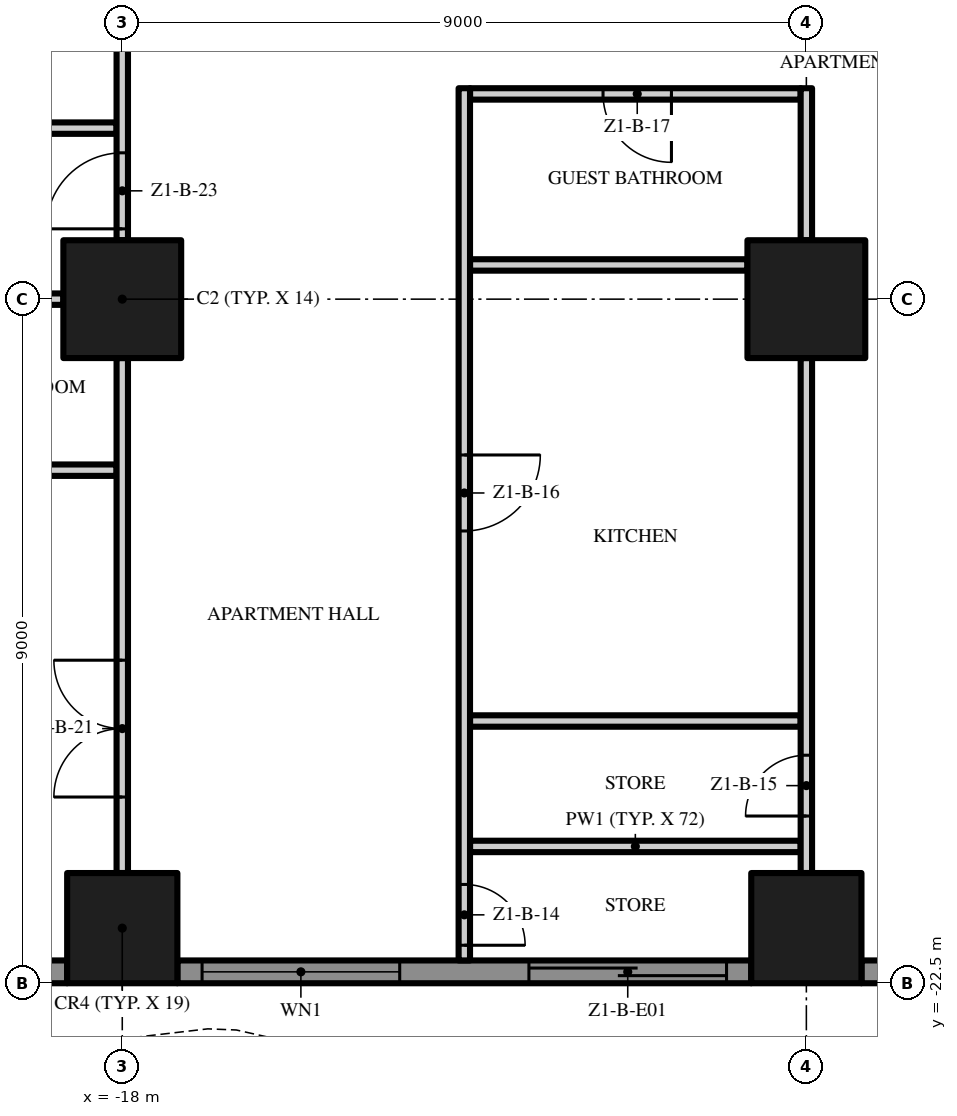
"""IFC4 building model, lengths in metres.
Left out: names, types, materials, properties, quantities, classifications, styles, units other than length and angle.
Written with IfcOpenShell. Run it as: python <this file> out.ifc"""

import sys

from ifc_helpers import new_model, si_unit, direction, frame, frame_2d, origin, origin_2d, place, context, subcontext, project, spatial, polyline, rectangle, outline, extrude, element, fill, save


model = new_model("IFC4")
c1 = context("Model", 3, precision=1e-05, world=origin(), true_north=direction((0.0, 1.0)))
c2 = subcontext(c1, "Body", "Model", "MODEL_VIEW")
j1 = project(units=[si_unit("LENGTHUNIT", "METRE"), si_unit("PLANEANGLEUNIT", "RADIAN")], contexts=[c1])
p1 = place(None, origin())
s1 = spatial("IfcSite", under=j1, at=p1, CompositionType="ELEMENT")
p2 = place(p1, origin())
s2 = spatial("IfcBuilding", under=s1, at=p2, CompositionType="ELEMENT")
p3 = place(p2, frame((0.0, 0.0, 26.4)))
s3 = spatial("IfcBuildingStorey", under=s2, at=p3, CompositionType="ELEMENT", Elevation=26.4)
p4 = place(p3, frame((-18.0, -13.5, 0.0), z_axis=(0.0, 0.0, 1.0), x_axis=(1.0, 0.0, 0.0)))
e1 = element("IfcColumn", 1, at=p4, inside=s3, PredefinedType="COLUMN", context=c2, shape_type="SweptSolid", body=[
    extrude(rectangle(XDim=1.55, YDim=1.55, at=origin_2d()), origin(), (0.0, 0.0, 1.0), 3.5),
])
p5 = place(p3, frame((-18.0, -21.775, 0.0), z_axis=(0.0, 0.0, 1.0), x_axis=(1.0, 0.0, 0.0)))
e2 = element("IfcColumn", 2, at=p5, inside=s3, PredefinedType="COLUMN", context=c2, shape_type="SweptSolid", body=[
    extrude(rectangle(XDim=1.45, YDim=1.45, at=origin_2d()), origin(), (0.0, 0.0, 1.0), 3.5),
])
p6 = place(p3, frame((-9.0, -13.5, 0.0), z_axis=(0.0, 0.0, 1.0), x_axis=(1.0, 0.0, 0.0)))
e3 = element("IfcColumn", 3, at=p6, inside=s3, PredefinedType="COLUMN", context=c2, shape_type="SweptSolid", body=[
    extrude(rectangle(XDim=1.55, YDim=1.55, at=origin_2d()), origin(), (0.0, 0.0, 1.0), 3.5),
])
p7 = place(p3, frame((-9.0, -21.775, 0.0), z_axis=(0.0, 0.0, 1.0), x_axis=(1.0, 0.0, 0.0)))
e4 = element("IfcColumn", 4, at=p7, inside=s3, PredefinedType="COLUMN", context=c2, shape_type="SweptSolid", body=[
    extrude(rectangle(XDim=1.45, YDim=1.45, at=origin_2d()), origin(), (0.0, 0.0, 1.0), 3.5),
])
p8 = place(p3, frame((-18.725, -22.35, 0.0), z_axis=(0.0, 0.0, 1.0), x_axis=(-1.0, 0.0, 0.0)))
e5 = element("IfcWall", 5, at=p8, inside=s3, PredefinedType="SOLIDWALL", context=c2, shape_type="SweptSolid", body=[
    extrude(rectangle(XDim=3.475, YDim=0.3, at=frame_2d((1.738, 0.0))), origin(), (0.0, 0.0, 1.0), 3.5),
])
p9 = place(p8, frame((0.325, 0.0, 0.45)))
e6 = element("IfcOpeningElement", 6, at=p9, cuts=e5, PredefinedType="OPENING", context=c2, shape_type="SweptSolid", body=[
    extrude(rectangle(XDim=2.6, YDim=2.65, at=frame_2d((1.3, 1.325))), frame((0.0, 0.16, 0.0), z_axis=(0.0, -1.0, 0.0), x_axis=(1.0, 0.0, 0.0)), (0.0, 0.0, 1.0), 0.32),
])
p10 = place(p3, frame((-9.725, -22.35, 0.0), z_axis=(0.0, 0.0, 1.0), x_axis=(-1.0, 0.0, 0.0)))
e7 = element("IfcWall", 7, at=p10, inside=s3, PredefinedType="SOLIDWALL", context=c2, shape_type="SweptSolid", body=[
    extrude(rectangle(XDim=7.55, YDim=0.3, at=frame_2d((3.775, 0.0))), origin(), (0.0, 0.0, 1.0), 3.5),
])
p11 = place(p10, frame((4.625, 0.0, 0.45)))
e8 = element("IfcOpeningElement", 8, at=p11, cuts=e7, PredefinedType="OPENING", context=c2, shape_type="SweptSolid", body=[
    extrude(rectangle(XDim=2.6, YDim=2.65, at=frame_2d((1.3, 1.325))), frame((0.0, 0.16, 0.0), z_axis=(0.0, -1.0, 0.0), x_axis=(1.0, 0.0, 0.0)), (0.0, 0.0, 1.0), 0.32),
])
p12 = place(p10, frame((0.325, 0.0, 0.0)))
e9 = element("IfcOpeningElement", 9, at=p12, cuts=e7, PredefinedType="OPENING", context=c2, shape_type="SweptSolid", body=[
    extrude(rectangle(XDim=2.6, YDim=2.4, at=frame_2d((1.3, 1.2))), frame((0.0, 0.16, 0.0), z_axis=(0.0, -1.0, 0.0), x_axis=(1.0, 0.0, 0.0)), (0.0, 0.0, 1.0), 0.32),
])
p13 = place(p3, frame((-0.725, -22.35, 0.0), z_axis=(0.0, 0.0, 1.0), x_axis=(-1.0, 0.0, 0.0)))
e10 = element("IfcWall", 10, at=p13, inside=s3, PredefinedType="SOLIDWALL", context=c2, shape_type="SweptSolid", body=[
    extrude(rectangle(XDim=7.55, YDim=0.3, at=frame_2d((3.775, 0.0))), origin(), (0.0, 0.0, 1.0), 3.5),
])
p14 = place(p13, frame((4.625, 0.0, 0.0)))
e11 = element("IfcOpeningElement", 11, at=p14, cuts=e10, PredefinedType="OPENING", context=c2, shape_type="SweptSolid", body=[
    extrude(rectangle(XDim=2.6, YDim=2.4, at=frame_2d((1.3, 1.2))), frame((0.0, 0.16, 0.0), z_axis=(0.0, -1.0, 0.0), x_axis=(1.0, 0.0, 0.0)), (0.0, 0.0, 1.0), 0.32),
])
p15 = place(p13, frame((0.325, 0.0, 0.45)))
e12 = element("IfcOpeningElement", 12, at=p15, cuts=e10, PredefinedType="OPENING", context=c2, shape_type="SweptSolid", body=[
    extrude(rectangle(XDim=2.6, YDim=2.65, at=frame_2d((1.3, 1.325))), frame((0.0, 0.16, 0.0), z_axis=(0.0, -1.0, 0.0), x_axis=(1.0, 0.0, 0.0)), (0.0, 0.0, 1.0), 0.32),
])
p16 = place(p3, origin())
e13 = element("IfcWall", 13, at=p16, inside=s3, PredefinedType="USERDEFINED", context=c2, shape_type="SweptSolid", body=[
    extrude(outline(polyline([(-22.5, -25.149), (-21.0, -24.488), (-19.5, -23.755), (-18.0, -23.231), (-16.875, -23.1), (-16.5, -23.115), (-15.0, -23.451), (-13.5, -24.112), (-12.0, -24.845), (-10.5, -25.369), (-9.375, -25.5), (-9.0, -25.485), (-7.5, -25.149), (-6.0, -24.488), (-4.5, -23.755), (-3.0, -23.231), (-1.875, -23.1), (-1.5, -23.115), (0.0, -23.451), (1.5, -24.112), (3.0, -24.845), (4.5, -25.369), (5.625, -25.5), (6.0, -25.485), (7.5, -25.149), (9.0, -24.488), (10.5, -23.755), (12.0, -23.231), (13.125, -23.1), (13.5, -23.115), (15.0, -23.451), (16.5, -24.112), (18.0, -24.845), (19.5, -25.369), (20.625, -25.5), (21.0, -25.485), (22.5, -25.149), (22.445, -24.905), (20.967, -25.236), (20.635, -25.249), (19.556, -25.124), (18.096, -24.614), (16.605, -23.885), (15.079, -23.213), (13.533, -22.866), (13.115, -22.849), (11.944, -22.986), (10.404, -23.524), (8.895, -24.261), (7.421, -24.91), (5.967, -25.236), (5.635, -25.249), (4.556, -25.124), (3.096, -24.614), (1.605, -23.885), (0.079, -23.213), (-1.467, -22.866), (-1.885, -22.849), (-3.056, -22.986), (-4.596, -23.524), (-6.105, -24.261), (-7.579, -24.91), (-9.033, -25.236), (-9.365, -25.249), (-10.444, -25.124), (-11.904, -24.614), (-13.395, -23.885), (-14.921, -23.213), (-16.467, -22.866), (-16.885, -22.849), (-18.056, -22.986), (-19.596, -23.524), (-21.105, -24.261), (-22.601, -24.92), (-22.5, -25.149)])), origin(), (0.0, 0.0, 1.0), 0.9),
])
for number, where, z_axis, x_axis in (
    (14, (-13.425, -20.7, 0.0), (0.0, 0.0, 1.0), (1.0, 0.0, 0.0)),
    (15, (-13.425, -19.05, 0.0), (0.0, 0.0, 1.0), (1.0, 0.0, 0.0)),
):
    element("IfcWall", number, at=place(p3, frame(where, z_axis=z_axis, x_axis=x_axis)), inside=s3, PredefinedType="PARTITIONING", context=c2, shape_type="SweptSolid", body=[
        extrude(rectangle(XDim=4.35, YDim=0.15, at=frame_2d((2.175, 0.0))), origin(), (0.0, 0.0, 1.0), 3.5),
    ])
p17 = place(p3, frame((-20.925, -15.75, 0.0), z_axis=(0.0, 0.0, 1.0), x_axis=(1.0, 0.0, 0.0)))
e16 = element("IfcWall", 16, at=p17, inside=s3, PredefinedType="PARTITIONING", context=c2, shape_type="SweptSolid", body=[
    extrude(rectangle(XDim=2.85, YDim=0.15, at=frame_2d((1.425, 0.0))), origin(), (0.0, 0.0, 1.0), 3.5),
])
p18 = place(p3, frame((-25.55, -13.5, 0.0), z_axis=(0.0, 0.0, 1.0), x_axis=(1.0, 0.0, 0.0)))
e17 = element("IfcWall", 17, at=p18, inside=s3, PredefinedType="PARTITIONING", context=c2, shape_type="SweptSolid", body=[
    extrude(rectangle(XDim=6.775, YDim=0.15, at=frame_2d((3.388, 0.0))), origin(), (0.0, 0.0, 1.0), 3.5),
])
p19 = place(p3, frame((-13.425, -13.05, 0.0), z_axis=(0.0, 0.0, 1.0), x_axis=(1.0, 0.0, 0.0)))
e18 = element("IfcWall", 18, at=p19, inside=s3, PredefinedType="PARTITIONING", context=c2, shape_type="SweptSolid", body=[
    extrude(rectangle(XDim=3.65, YDim=0.15, at=frame_2d((1.825, 0.0))), origin(), (0.0, 0.0, 1.0), 3.5),
])
p20 = place(p3, frame((-20.925, -11.25, 0.0), z_axis=(0.0, 0.0, 1.0), x_axis=(1.0, 0.0, 0.0)))
e19 = element("IfcWall", 19, at=p20, inside=s3, PredefinedType="PARTITIONING", context=c2, shape_type="SweptSolid", body=[
    extrude(rectangle(XDim=2.85, YDim=0.15, at=frame_2d((1.425, 0.0))), origin(), (0.0, 0.0, 1.0), 3.5),
])
p21 = place(p3, frame((-9.075, -10.8, 0.0), z_axis=(0.0, 0.0, 1.0), x_axis=(-1.0, 0.0, 0.0)))
e20 = element("IfcWall", 20, at=p21, inside=s3, PredefinedType="PARTITIONING", context=c2, shape_type="SweptSolid", body=[
    extrude(rectangle(XDim=4.35, YDim=0.15, at=frame_2d((2.175, 0.0))), origin(), (0.0, 0.0, 1.0), 3.5),
])
p22 = place(p21, frame((1.7, 0.0, 0.0)))
e21 = element("IfcOpeningElement", 21, at=p22, cuts=e20, PredefinedType="OPENING", context=c2, shape_type="SweptSolid", body=[
    extrude(rectangle(XDim=0.9, YDim=2.1, at=frame_2d((0.45, 1.05))), frame((0.0, 0.085, 0.0), z_axis=(0.0, -1.0, 0.0), x_axis=(1.0, 0.0, 0.0)), (0.0, 0.0, 1.0), 0.17),
])
p23 = place(p3, frame((-18.0, -21.05, 0.0), z_axis=(0.0, 0.0, 1.0), x_axis=(0.0, 1.0, 0.0)))
e22 = element("IfcWall", 22, at=p23, inside=s3, PredefinedType="PARTITIONING", context=c2, shape_type="SweptSolid", body=[
    extrude(rectangle(XDim=6.775, YDim=0.15, at=frame_2d((3.388, 0.0))), origin(), (0.0, 0.0, 1.0), 3.5),
])
p24 = place(p23, frame((1.0, 0.0, 0.0)))
e23 = element("IfcOpeningElement", 23, at=p24, cuts=e22, PredefinedType="OPENING", context=c2, shape_type="SweptSolid", body=[
    extrude(rectangle(XDim=1.8, YDim=2.4, at=frame_2d((0.9, 1.2))), frame((0.0, 0.085, 0.0), z_axis=(0.0, -1.0, 0.0), x_axis=(1.0, 0.0, 0.0)), (0.0, 0.0, 1.0), 0.17),
])
p25 = place(p3, frame((-18.0, -12.725, 0.0), z_axis=(0.0, 0.0, 1.0), x_axis=(0.0, 1.0, 0.0)))
e24 = element("IfcWall", 24, at=p25, inside=s3, PredefinedType="PARTITIONING", context=c2, shape_type="SweptSolid", body=[
    extrude(rectangle(XDim=7.45, YDim=0.15, at=frame_2d((3.725, 0.0))), origin(), (0.0, 0.0, 1.0), 3.5),
])
p26 = place(p25, frame((0.15, 0.0, 0.0)))
e25 = element("IfcOpeningElement", 25, at=p26, cuts=e24, PredefinedType="OPENING", context=c2, shape_type="SweptSolid", body=[
    extrude(rectangle(XDim=1.0, YDim=2.4, at=frame_2d((0.5, 1.2))), frame((0.0, 0.085, 0.0), z_axis=(0.0, -1.0, 0.0), x_axis=(1.0, 0.0, 0.0)), (0.0, 0.0, 1.0), 0.17),
])
p27 = place(p25, frame((6.3, 0.0, 0.0)))
e26 = element("IfcOpeningElement", 26, at=p27, cuts=e24, PredefinedType="OPENING", context=c2, shape_type="SweptSolid", body=[
    extrude(rectangle(XDim=1.0, YDim=2.4, at=frame_2d((0.5, 1.2))), frame((0.0, 0.085, 0.0), z_axis=(0.0, -1.0, 0.0), x_axis=(1.0, 0.0, 0.0)), (0.0, 0.0, 1.0), 0.17),
])
p28 = place(p3, frame((-13.5, -10.725, 0.0), z_axis=(0.0, 0.0, 1.0), x_axis=(0.0, -1.0, 0.0)))
e27 = element("IfcWall", 27, at=p28, inside=s3, PredefinedType="PARTITIONING", context=c2, shape_type="SweptSolid", body=[
    extrude(rectangle(XDim=11.475, YDim=0.15, at=frame_2d((5.737, 0.0))), origin(), (0.0, 0.0, 1.0), 3.5),
])
p29 = place(p28, frame((10.475, 0.0, 0.0)))
e28 = element("IfcOpeningElement", 28, at=p29, cuts=e27, PredefinedType="OPENING", context=c2, shape_type="SweptSolid", body=[
    extrude(rectangle(XDim=0.8, YDim=2.0, at=frame_2d((0.4, 1.0))), frame((0.0, 0.085, 0.0), z_axis=(0.0, -1.0, 0.0), x_axis=(1.0, 0.0, 0.0)), (0.0, 0.0, 1.0), 0.17),
])
p30 = place(p28, frame((4.825, 0.0, 0.0)))
e29 = element("IfcOpeningElement", 29, at=p30, cuts=e27, PredefinedType="OPENING", context=c2, shape_type="SweptSolid", body=[
    extrude(rectangle(XDim=1.0, YDim=2.4, at=frame_2d((0.5, 1.2))), frame((0.0, 0.085, 0.0), z_axis=(0.0, -1.0, 0.0), x_axis=(1.0, 0.0, 0.0)), (0.0, 0.0, 1.0), 0.17),
])
p31 = place(p3, frame((-9.0, -21.05, 0.0), z_axis=(0.0, 0.0, 1.0), x_axis=(0.0, 1.0, 0.0)))
e30 = element("IfcWall", 30, at=p31, inside=s3, PredefinedType="PARTITIONING", context=c2, shape_type="SweptSolid", body=[
    extrude(rectangle(XDim=6.775, YDim=0.15, at=frame_2d((3.388, 0.0))), origin(), (0.0, 0.0, 1.0), 3.5),
])
p32 = place(p31, frame((0.75, 0.0, 0.0)))
e31 = element("IfcOpeningElement", 31, at=p32, cuts=e30, PredefinedType="OPENING", context=c2, shape_type="SweptSolid", body=[
    extrude(rectangle(XDim=0.8, YDim=2.0, at=frame_2d((0.4, 1.0))), frame((0.0, 0.085, 0.0), z_axis=(0.0, -1.0, 0.0), x_axis=(1.0, 0.0, 0.0)), (0.0, 0.0, 1.0), 0.17),
])
p33 = place(p3, frame((-9.0, -12.725, 0.0), z_axis=(0.0, 0.0, 1.0), x_axis=(0.0, 1.0, 0.0)))
e32 = element("IfcWall", 32, at=p33, inside=s3, PredefinedType="PARTITIONING", context=c2, shape_type="SweptSolid", body=[
    extrude(rectangle(XDim=2.0, YDim=0.15, at=frame_2d((1.0, 0.0))), origin(), (0.0, 0.0, 1.0), 3.5),
])
p34 = place(p11, origin())
e33 = element("IfcWindow", 33, at=p34, inside=s3, PartitioningType="SINGLE_PANEL", PredefinedType="WINDOW", context=c2, shape_type="SweptSolid", body=[
    extrude(rectangle(XDim=2.6, YDim=2.65, at=frame_2d((1.3, 1.325))), frame((0.0, 0.03, 0.0), z_axis=(0.0, -1.0, 0.0), x_axis=(1.0, 0.0, 0.0)), (0.0, 0.0, 1.0), 0.06),
])
fill(e8, e33)
p35 = place(p12, origin())
e34 = element("IfcDoor", 34, at=p35, inside=s3, OperationType="SINGLE_SWING_LEFT", PredefinedType="DOOR", context=c2, shape_type="SweptSolid", body=[
    extrude(rectangle(XDim=2.6, YDim=2.4, at=frame_2d((1.3, 1.2))), frame((0.0, 0.025, 0.0), z_axis=(0.0, -1.0, 0.0), x_axis=(1.0, 0.0, 0.0)), (0.0, 0.0, 1.0), 0.05),
])
fill(e9, e34)
p36 = place(p29, origin())
e35 = element("IfcDoor", 35, at=p36, inside=s3, OperationType="SINGLE_SWING_RIGHT", PredefinedType="DOOR", context=c2, shape_type="SweptSolid", body=[
    extrude(rectangle(XDim=0.8, YDim=2.0, at=frame_2d((0.4, 1.0))), frame((0.0, 0.025, 0.0), z_axis=(0.0, -1.0, 0.0), x_axis=(1.0, 0.0, 0.0)), (0.0, 0.0, 1.0), 0.05),
])
fill(e28, e35)
p37 = place(p32, origin())
e36 = element("IfcDoor", 36, at=p37, inside=s3, OperationType="SINGLE_SWING_LEFT", PredefinedType="DOOR", context=c2, shape_type="SweptSolid", body=[
    extrude(rectangle(XDim=0.8, YDim=2.0, at=frame_2d((0.4, 1.0))), frame((0.0, 0.025, 0.0), z_axis=(0.0, -1.0, 0.0), x_axis=(1.0, 0.0, 0.0)), (0.0, 0.0, 1.0), 0.05),
])
fill(e31, e36)
p38 = place(p30, origin())
e37 = element("IfcDoor", 37, at=p38, inside=s3, OperationType="SINGLE_SWING_LEFT", PredefinedType="DOOR", context=c2, shape_type="SweptSolid", body=[
    extrude(rectangle(XDim=1.0, YDim=2.4, at=frame_2d((0.5, 1.2))), frame((0.0, 0.025, 0.0), z_axis=(0.0, -1.0, 0.0), x_axis=(1.0, 0.0, 0.0)), (0.0, 0.0, 1.0), 0.05),
])
fill(e29, e37)
p39 = place(p22, origin())
e38 = element("IfcDoor", 38, at=p39, inside=s3, OperationType="SINGLE_SWING_LEFT", PredefinedType="DOOR", context=c2, shape_type="SweptSolid", body=[
    extrude(rectangle(XDim=0.9, YDim=2.1, at=frame_2d((0.45, 1.05))), frame((0.0, 0.025, 0.0), z_axis=(0.0, -1.0, 0.0), x_axis=(1.0, 0.0, 0.0)), (0.0, 0.0, 1.0), 0.05),
])
fill(e21, e38)
p40 = place(p24, origin())
e39 = element("IfcDoor", 39, at=p40, inside=s3, OperationType="DOUBLE_DOOR_SINGLE_SWING", PredefinedType="DOOR", context=c2, shape_type="SweptSolid", body=[
    extrude(rectangle(XDim=1.8, YDim=2.4, at=frame_2d((0.9, 1.2))), frame((0.0, 0.025, 0.0), z_axis=(0.0, -1.0, 0.0), x_axis=(1.0, 0.0, 0.0)), (0.0, 0.0, 1.0), 0.05),
])
fill(e23, e39)
p41 = place(p26, origin())
e40 = element("IfcDoor", 40, at=p41, inside=s3, OperationType="SINGLE_SWING_LEFT", PredefinedType="DOOR", context=c2, shape_type="SweptSolid", body=[
    extrude(rectangle(XDim=1.0, YDim=2.4, at=frame_2d((0.5, 1.2))), frame((0.0, 0.025, 0.0), z_axis=(0.0, -1.0, 0.0), x_axis=(1.0, 0.0, 0.0)), (0.0, 0.0, 1.0), 0.05),
])
fill(e25, e40)
save(model, sys.argv[1])
